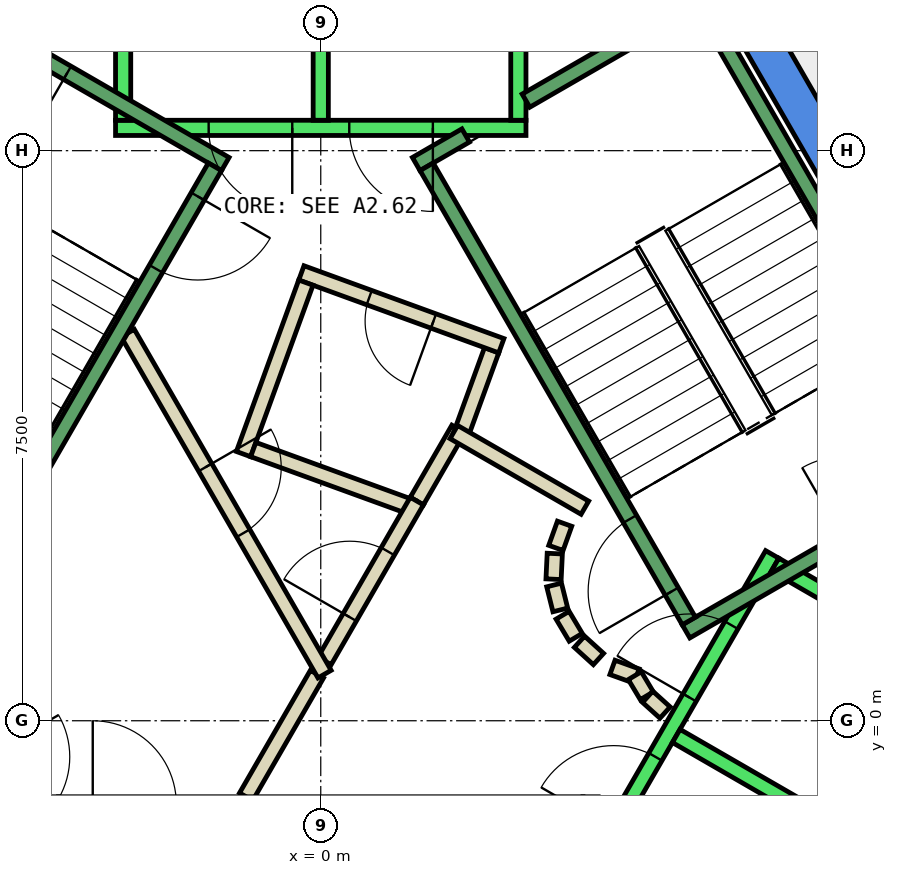
"""IFC4 building model, lengths in metres.
Left out: names, types, materials, properties, quantities, classifications, styles, units other than length and angle.
Written with IfcOpenShell. Run it as: python <this file> out.ifc"""

import sys

from ifc_helpers import new_model, si_unit, direction, frame, frame_2d, origin, place, context, subcontext, project, spatial, polyline, rectangle, outline, extrude, element, fill, save


model = new_model("IFC4")
c1 = context("Model", 3, precision=1e-05, world=origin(), true_north=direction((0.0, 1.0)))
c2 = subcontext(c1, "Body", "Model", "MODEL_VIEW")
j1 = project(units=[si_unit("LENGTHUNIT", "METRE"), si_unit("PLANEANGLEUNIT", "RADIAN")], contexts=[c1])
p1 = place(None, origin())
s1 = spatial("IfcSite", under=j1, at=p1, CompositionType="ELEMENT")
p2 = place(p1, origin())
s2 = spatial("IfcBuilding", under=s1, at=p2, CompositionType="ELEMENT")
p3 = place(p2, frame((0.0, 0.0, 293.6)))
s3 = spatial("IfcBuildingStorey", under=s2, at=p3, CompositionType="ELEMENT", Elevation=293.6)
p4 = place(p3, frame((0.0, 0.0, -0.34)))
e1 = element("IfcWall", 1, at=p4, inside=s3, PredefinedType="SHEAR", context=c2, shape_type="SweptSolid", body=[
    extrude(outline(polyline([(5.486, 9.998), (5.053, 9.748), (9.238, 2.5), (9.815, 2.5), (5.486, 9.998)])), origin(), (0.0, 0.0, 1.0), 3.6),
])
p5 = place(p3, frame((0.0, 0.0, -0.34)))
e2 = element("IfcWall", 2, at=p5, inside=s3, PredefinedType="SHEAR", context=c2, shape_type="SweptSolid", body=[
    extrude(outline(polyline([(4.907, -6.0), (9.815, 2.5), (9.238, 2.5), (4.619, -5.5), (4.907, -6.0)])), origin(), (0.0, 0.0, 1.0), 3.6),
])
p6 = place(p3, frame((1.264, 2.89, 0.0), z_axis=(0.0, 0.0, 1.0), x_axis=(0.500043792738, 0.866000118559, 0.0)))
e3 = element("IfcWall", 3, at=p6, inside=s3, PredefinedType="PARTITIONING", context=c2, shape_type="SweptSolid", body=[
    extrude(rectangle(XDim=1.096, YDim=0.2, at=frame_2d((0.548, 0.0))), origin(), (0.0, 0.0, 1.0), 3.26),
])
p7 = place(p3, frame((1.838, 3.748, 0.0), z_axis=(0.0, 0.0, 1.0), x_axis=(0.342266462435, 0.939602931398, 0.0)))
e4 = element("IfcWall", 4, at=p7, inside=s3, PredefinedType="PARTITIONING", context=c2, shape_type="SweptSolid", body=[
    extrude(rectangle(XDim=1.198, YDim=0.2, at=frame_2d((0.599, 0.0))), origin(), (0.0, 0.0, 1.0), 3.26),
])
p8 = place(p3, frame((2.376, 4.934, 0.0), z_axis=(0.0, 0.0, 1.0), x_axis=(-0.939640574808, 0.342163104635, 0.0)))
e5 = element("IfcWall", 5, at=p8, inside=s3, PredefinedType="PARTITIONING", context=c2, shape_type="SweptSolid", body=[
    extrude(rectangle(XDim=2.8, YDim=0.2, at=frame_2d((1.4, 0.0))), origin(), (0.0, 0.0, 1.0), 3.26),
])
p9 = place(p8, frame((0.95, 0.0, 0.0)))
e6 = element("IfcOpeningElement", 6, at=p9, cuts=e5, PredefinedType="OPENING", context=c2, shape_type="SweptSolid", body=[
    extrude(rectangle(XDim=0.9, YDim=2.1, at=frame_2d((0.45, 1.05))), frame((0.0, 0.11, 0.0), z_axis=(0.0, -1.0, 0.0), x_axis=(1.0, 0.0, 0.0)), (0.0, 0.0, 1.0), 0.22),
])
p10 = place(p3, frame((-0.196, 5.764, 0.0), z_axis=(0.0, 0.0, 1.0), x_axis=(-0.34165322761, -0.939826086073, 0.0)))
e7 = element("IfcWall", 7, at=p10, inside=s3, PredefinedType="PARTITIONING", context=c2, shape_type="SweptSolid", body=[
    extrude(rectangle(XDim=2.4, YDim=0.2, at=frame_2d((1.2, 0.0))), origin(), (0.0, 0.0, 1.0), 3.26),
])
p11 = place(p3, frame((-0.888, 3.568, 0.0), z_axis=(0.0, 0.0, 1.0), x_axis=(0.939685034098, -0.34204098686, 0.0)))
e8 = element("IfcWall", 8, at=p11, inside=s3, PredefinedType="PARTITIONING", context=c2, shape_type="SweptSolid", body=[
    extrude(rectangle(XDim=2.237, YDim=0.2, at=frame_2d((1.119, 0.0))), origin(), (0.0, 0.0, 1.0), 3.26),
])
p12 = place(p3, frame((-0.982, -1.0, 0.0), z_axis=(0.0, 0.0, 1.0), x_axis=(0.50024047865, 0.865886518847, 0.0)))
e9 = element("IfcWall", 9, at=p12, inside=s3, PredefinedType="PARTITIONING", context=c2, shape_type="SweptSolid", body=[
    extrude(rectangle(XDim=1.863, YDim=0.2, at=frame_2d((0.931, 0.0))), origin(), (0.0, 0.0, 1.0), 3.26),
])
p13 = place(p3, frame((0.05, 0.787, 0.0), z_axis=(0.0, 0.0, 1.0), x_axis=(0.499945861543, 0.866056658381, 0.0)))
e10 = element("IfcWall", 10, at=p13, inside=s3, PredefinedType="PARTITIONING", context=c2, shape_type="SweptSolid", body=[
    extrude(rectangle(XDim=2.428, YDim=0.2, at=frame_2d((1.214, 0.0))), origin(), (0.0, 0.0, 1.0), 3.26),
])
p14 = place(p13, frame((0.664, 0.0, 0.0)))
e11 = element("IfcOpeningElement", 11, at=p14, cuts=e10, PredefinedType="OPENING", context=c2, shape_type="SweptSolid", body=[
    extrude(rectangle(XDim=1.0, YDim=2.1, at=frame_2d((0.5, 1.05))), frame((0.0, 0.11, 0.0), z_axis=(0.0, -1.0, 0.0), x_axis=(1.0, 0.0, 0.0)), (0.0, 0.0, 1.0), 0.22),
])
p15 = place(p3, frame((1.751, 3.798, 0.0), z_axis=(0.0, 0.0, 1.0), x_axis=(0.866091650241, -0.499885240213, 0.0)))
e12 = element("IfcWall", 12, at=p15, inside=s3, PredefinedType="PARTITIONING", context=c2, shape_type="SweptSolid", body=[
    extrude(rectangle(XDim=1.991, YDim=0.2, at=frame_2d((0.995, 0.0))), origin(), (0.0, 0.0, 1.0), 3.26),
])
p16 = place(p3, frame((3.208, 2.592, 0.0), z_axis=(0.0, 0.0, 1.0), x_axis=(-0.337388820924, -0.941365382578, 0.0)))
e13 = element("IfcWall", 13, at=p16, inside=s3, PredefinedType="PARTITIONING", context=c2, shape_type="SweptSolid", body=[
    extrude(rectangle(XDim=0.338, YDim=0.2, at=frame_2d((0.169, 0.0))), origin(), (0.0, 0.0, 1.0), 3.26),
])
p17 = place(p3, frame((3.079, 2.199, 0.0), z_axis=(0.0, 0.0, 1.0), x_axis=(-0.047771483479, -0.998858290933, 0.0)))
e14 = element("IfcWall", 14, at=p17, inside=s3, PredefinedType="PARTITIONING", context=c2, shape_type="SweptSolid", body=[
    extrude(rectangle(XDim=0.337, YDim=0.2, at=frame_2d((0.169, 0.0))), origin(), (0.0, 0.0, 1.0), 3.26),
])
p18 = place(p3, frame((3.07, 1.786, 0.0), z_axis=(0.0, 0.0, 1.0), x_axis=(0.242705583207, -0.970099994784, 0.0)))
e15 = element("IfcWall", 15, at=p18, inside=s3, PredefinedType="PARTITIONING", context=c2, shape_type="SweptSolid", body=[
    extrude(rectangle(XDim=0.338, YDim=0.2, at=frame_2d((0.169, 0.0))), origin(), (0.0, 0.0, 1.0), 3.26),
])
for number, where, z_axis, x_axis in (
    (16, (3.182, 1.388, 0.0), (0.0, 0.0, 1.0), (0.512, -0.859, 0.0)),
    (17, (3.404, 1.039, 0.0), (0.0, 0.0, 1.0), (0.74, -0.672, 0.0)),
):
    element("IfcWall", number, at=place(p3, frame(where, z_axis=z_axis, x_axis=x_axis)), inside=s3, PredefinedType="PARTITIONING", context=c2, shape_type="SweptSolid", body=[
        extrude(rectangle(XDim=0.338, YDim=0.2, at=frame_2d((0.169, 0.0))), origin(), (0.0, 0.0, 1.0), 3.26),
    ])
p19 = place(p3, frame((3.838, 0.702, 0.0), z_axis=(0.0, 0.0, 1.0), x_axis=(0.941035081519, -0.338308993895, 0.0)))
e18 = element("IfcWall", 18, at=p19, inside=s3, PredefinedType="PARTITIONING", context=c2, shape_type="SweptSolid", body=[
    extrude(rectangle(XDim=0.337, YDim=0.2, at=frame_2d((0.168, 0.0))), origin(), (0.0, 0.0, 1.0), 3.26),
])
p20 = place(p3, frame((4.132, 0.593, 0.0), z_axis=(0.0, 0.0, 1.0), x_axis=(0.513561617048, -0.858052717201, 0.0)))
e19 = element("IfcWall", 19, at=p20, inside=s3, PredefinedType="PARTITIONING", context=c2, shape_type="SweptSolid", body=[
    extrude(rectangle(XDim=0.308, YDim=0.2, at=frame_2d((0.154, 0.0))), origin(), (0.0, 0.0, 1.0), 3.26),
])
p21 = place(p3, frame((4.301, 0.315, 0.0), z_axis=(0.0, 0.0, 1.0), x_axis=(0.741798017506, -0.670623367639, 0.0)))
e20 = element("IfcWall", 20, at=p21, inside=s3, PredefinedType="PARTITIONING", context=c2, shape_type="SweptSolid", body=[
    extrude(rectangle(XDim=0.309, YDim=0.2, at=frame_2d((0.154, 0.0))), origin(), (0.0, 0.0, 1.0), 3.26),
])
p22 = place(p3, frame((-2.54, 5.1, 0.0), z_axis=(0.0, 0.0, 1.0), x_axis=(0.499925051871, -0.866068670783, 0.0)))
e21 = element("IfcWall", 21, at=p22, inside=s3, PredefinedType="PARTITIONING", context=c2, shape_type="SweptSolid", body=[
    extrude(rectangle(XDim=5.181, YDim=0.2, at=frame_2d((2.59, 0.0))), origin(), (0.0, 0.0, 1.0), 3.26),
])
p23 = place(p22, frame((2.04, 0.0, 0.0)))
e22 = element("IfcOpeningElement", 22, at=p23, cuts=e21, PredefinedType="OPENING", context=c2, shape_type="SweptSolid", body=[
    extrude(rectangle(XDim=1.0, YDim=2.1, at=frame_2d((0.5, 1.05))), frame((0.0, 0.11, 0.0), z_axis=(0.0, -1.0, 0.0), x_axis=(1.0, 0.0, 0.0)), (0.0, 0.0, 1.0), 0.22),
])
p24 = place(p3, frame((2.7, 7.8, 0.0), z_axis=(0.0, 0.0, 1.0), x_axis=(-1.0, 0.0, 0.0)))
e23 = element("IfcWall", 23, at=p24, inside=s3, PredefinedType="STANDARD", context=c2, shape_type="SweptSolid", body=[
    extrude(rectangle(XDim=5.4, YDim=0.2, at=frame_2d((2.7, 0.0))), origin(), (0.0, 0.0, 1.0), 3.26),
])
p25 = place(p24, frame((1.225, 0.0, 0.0)))
e24 = element("IfcOpeningElement", 24, at=p25, cuts=e23, PredefinedType="OPENING", context=c2, shape_type="SweptSolid", body=[
    extrude(rectangle(XDim=1.1, YDim=2.1, at=frame_2d((0.55, 1.05))), frame((0.0, 0.11, 0.0), z_axis=(0.0, -1.0, 0.0), x_axis=(1.0, 0.0, 0.0)), (0.0, 0.0, 1.0), 0.22),
])
p26 = place(p24, frame((3.075, 0.0, 0.0)))
e25 = element("IfcOpeningElement", 25, at=p26, cuts=e23, PredefinedType="OPENING", context=c2, shape_type="SweptSolid", body=[
    extrude(rectangle(XDim=1.1, YDim=2.1, at=frame_2d((0.55, 1.05))), frame((0.0, 0.11, 0.0), z_axis=(0.0, -1.0, 0.0), x_axis=(1.0, 0.0, 0.0)), (0.0, 0.0, 1.0), 0.22),
])
for number, where, z_axis, x_axis in (
    (26, (2.6, 7.9, 0.0), (0.0, 0.0, 1.0), (0.0, 1.0, 0.0)),
    (27, (0.0, 7.9, 0.0), (0.0, 0.0, 1.0), (0.0, 1.0, 0.0)),
    (28, (-2.6, 7.9, 0.0), (0.0, 0.0, 1.0), (0.0, 1.0, 0.0)),
):
    element("IfcWall", number, at=place(p3, frame(where, z_axis=z_axis, x_axis=x_axis)), inside=s3, PredefinedType="STANDARD", context=c2, shape_type="SweptSolid", body=[
        extrude(rectangle(XDim=2.4, YDim=0.2, at=frame_2d((1.2, 0.0))), origin(), (0.0, 0.0, 1.0), 3.26),
    ])
p27 = place(p3, frame((-5.94, 2.188, 0.0), z_axis=(0.0, 0.0, 1.0), x_axis=(0.500034260056, -0.866005622828, 0.0)))
e29 = element("IfcWall", 29, at=p27, inside=s3, PredefinedType="STANDARD", context=c2, shape_type="SweptSolid", body=[
    extrude(rectangle(XDim=5.399, YDim=0.2, at=frame_2d((2.7, 0.0))), origin(), (0.0, 0.0, 1.0), 3.26),
])
p28 = place(p27, frame((3.075, 0.0, 0.0)))
e30 = element("IfcOpeningElement", 30, at=p28, cuts=e29, PredefinedType="OPENING", context=c2, shape_type="SweptSolid", body=[
    extrude(rectangle(XDim=1.1, YDim=2.1, at=frame_2d((0.55, 1.05))), frame((0.0, 0.11, 0.0), z_axis=(0.0, -1.0, 0.0), x_axis=(1.0, 0.0, 0.0)), (0.0, 0.0, 1.0), 0.22),
])
p29 = place(p27, frame((1.225, 0.0, 0.0)))
e31 = element("IfcOpeningElement", 31, at=p29, cuts=e29, PredefinedType="OPENING", context=c2, shape_type="SweptSolid", body=[
    extrude(rectangle(XDim=1.1, YDim=2.1, at=frame_2d((0.55, 1.05))), frame((0.0, 0.11, 0.0), z_axis=(0.0, -1.0, 0.0), x_axis=(1.0, 0.0, 0.0)), (0.0, 0.0, 1.0), 0.22),
])
p30 = place(p3, frame((3.24, -2.488, 0.0), z_axis=(0.0, 0.0, 1.0), x_axis=(0.500034260056, 0.866005622828, 0.0)))
e32 = element("IfcWall", 32, at=p30, inside=s3, PredefinedType="STANDARD", context=c2, shape_type="SweptSolid", body=[
    extrude(rectangle(XDim=5.399, YDim=0.2, at=frame_2d((2.7, 0.0))), origin(), (0.0, 0.0, 1.0), 3.26),
])
p31 = place(p30, frame((3.225, 0.0, 0.0)))
e33 = element("IfcOpeningElement", 33, at=p31, cuts=e32, PredefinedType="OPENING", context=c2, shape_type="SweptSolid", body=[
    extrude(rectangle(XDim=1.1, YDim=2.1, at=frame_2d((0.55, 1.05))), frame((0.0, 0.11, 0.0), z_axis=(0.0, -1.0, 0.0), x_axis=(1.0, 0.0, 0.0)), (0.0, 0.0, 1.0), 0.22),
])
p32 = place(p30, frame((1.225, 0.0, 0.0)))
e34 = element("IfcOpeningElement", 34, at=p32, cuts=e32, PredefinedType="OPENING", context=c2, shape_type="SweptSolid", body=[
    extrude(rectangle(XDim=1.1, YDim=2.1, at=frame_2d((0.55, 1.05))), frame((0.0, 0.11, 0.0), z_axis=(0.0, -1.0, 0.0), x_axis=(1.0, 0.0, 0.0)), (0.0, 0.0, 1.0), 0.22),
])
p33 = place(p3, frame((5.492, -3.788, 0.0), z_axis=(0.0, 0.0, 1.0), x_axis=(0.500034260056, 0.866005622828, 0.0)))
e35 = element("IfcWall", 35, at=p33, inside=s3, PredefinedType="STANDARD", context=c2, shape_type="SweptSolid", body=[
    extrude(rectangle(XDim=5.399, YDim=0.2, at=frame_2d((2.7, 0.0))), origin(), (0.0, 0.0, 1.0), 3.26),
])
for number, where, z_axis, x_axis in (
    (36, (4.677, -0.2, 0.0), (0.0, 0.0, 1.0), (0.866, -0.5, 0.0)),
    (37, (5.977, 2.052, 0.0), (0.0, 0.0, 1.0), (0.866, -0.5, 0.0)),
):
    element("IfcWall", number, at=place(p3, frame(where, z_axis=z_axis, x_axis=x_axis)), inside=s3, PredefinedType="STANDARD", context=c2, shape_type="SweptSolid", body=[
        extrude(rectangle(XDim=2.399, YDim=0.2, at=frame_2d((1.2, 0.0))), origin(), (0.0, 0.0, 1.0), 3.26),
    ])
p34 = place(p3, frame((4.806, 1.176, 0.0), z_axis=(0.0, 0.0, 1.0), x_axis=(0.866059941101, 0.499940174841, 0.0)))
e38 = element("IfcWall", 38, at=p34, inside=s3, PredefinedType="STANDARD", context=c2, shape_type="SweptSolid", body=[
    extrude(rectangle(XDim=4.4, YDim=0.2, at=frame_2d((2.2, 0.0))), origin(), (0.0, 0.0, 1.0), 3.26),
])
p35 = place(p34, frame((2.4, 0.0, 0.0)))
e39 = element("IfcOpeningElement", 39, at=p35, cuts=e38, PredefinedType="OPENING", context=c2, shape_type="SweptSolid", body=[
    extrude(rectangle(XDim=1.1, YDim=2.2, at=frame_2d((0.55, 1.1))), frame((0.0, 0.11, 0.0), z_axis=(0.0, -1.0, 0.0), x_axis=(1.0, 0.0, 0.0)), (0.0, 0.0, 1.0), 0.22),
])
p36 = place(p3, frame((2.7, 8.158, 0.0), z_axis=(0.0, 0.0, 1.0), x_axis=(0.86611865017, 0.499838457731, 0.0)))
e40 = element("IfcWall", 40, at=p36, inside=s3, PredefinedType="STANDARD", context=c2, shape_type="SweptSolid", body=[
    extrude(rectangle(XDim=2.733, YDim=0.2, at=frame_2d((1.366, 0.0))), origin(), (0.0, 0.0, 1.0), 3.26),
])
p37 = place(p3, frame((1.256, 7.324, 0.0), z_axis=(0.0, 0.0, 1.0), x_axis=(0.865915093549, 0.500191014278, 0.0)))
e41 = element("IfcWall", 41, at=p37, inside=s3, PredefinedType="STANDARD", context=c2, shape_type="SweptSolid", body=[
    extrude(rectangle(XDim=0.752, YDim=0.2, at=frame_2d((0.376, 0.0))), origin(), (0.0, 0.0, 1.0), 3.26),
])
p38 = place(p3, frame((4.843, 1.312, 0.0), z_axis=(0.0, 0.0, 1.0), x_axis=(-0.499963383562, 0.866046543262, 0.0)))
e42 = element("IfcWall", 42, at=p38, inside=s3, PredefinedType="STANDARD", context=c2, shape_type="SweptSolid", body=[
    extrude(rectangle(XDim=6.9, YDim=0.2, at=frame_2d((3.45, 0.0))), origin(), (0.0, 0.0, 1.0), 3.26),
])
p39 = place(p38, frame((0.45, 0.0, 0.0)))
e43 = element("IfcOpeningElement", 43, at=p39, cuts=e42, PredefinedType="OPENING", context=c2, shape_type="SweptSolid", body=[
    extrude(rectangle(XDim=1.1, YDim=2.2, at=frame_2d((0.55, 1.1))), frame((0.0, 0.11, 0.0), z_axis=(0.0, -1.0, 0.0), x_axis=(1.0, 0.0, 0.0)), (0.0, 0.0, 1.0), 0.22),
])
p40 = place(p3, frame((8.48, 3.412, 0.0), z_axis=(0.0, 0.0, 1.0), x_axis=(-0.499978703459, 0.866037698999, 0.0)))
e44 = element("IfcWall", 44, at=p40, inside=s3, PredefinedType="STANDARD", context=c2, shape_type="SweptSolid", body=[
    extrude(rectangle(XDim=6.9, YDim=0.2, at=frame_2d((3.45, 0.0))), origin(), (0.0, 0.0, 1.0), 3.26),
])
p41 = place(p3, frame((-1.256, 7.324, 0.0), z_axis=(0.0, 0.0, 1.0), x_axis=(-0.866046073146, 0.499964197906, 0.0)))
e45 = element("IfcWall", 45, at=p41, inside=s3, PredefinedType="STANDARD", context=c2, shape_type="SweptSolid", body=[
    extrude(rectangle(XDim=4.4, YDim=0.2, at=frame_2d((2.2, 0.0))), origin(), (0.0, 0.0, 1.0), 3.26),
])
p42 = place(p41, frame((2.4, 0.0, 0.0)))
e46 = element("IfcOpeningElement", 46, at=p42, cuts=e45, PredefinedType="OPENING", context=c2, shape_type="SweptSolid", body=[
    extrude(rectangle(XDim=1.1, YDim=2.2, at=frame_2d((0.55, 1.1))), frame((0.0, 0.11, 0.0), z_axis=(0.0, -1.0, 0.0), x_axis=(1.0, 0.0, 0.0)), (0.0, 0.0, 1.0), 0.22),
])
p43 = place(p3, frame((-1.393, 7.288, 0.0), z_axis=(0.0, 0.0, 1.0), x_axis=(-0.499963383562, -0.866046543262, 0.0)))
e47 = element("IfcWall", 47, at=p43, inside=s3, PredefinedType="STANDARD", context=c2, shape_type="SweptSolid", body=[
    extrude(rectangle(XDim=6.9, YDim=0.2, at=frame_2d((3.45, 0.0))), origin(), (0.0, 0.0, 1.0), 3.26),
])
p44 = place(p43, frame((0.45, 0.0, 0.0)))
e48 = element("IfcOpeningElement", 48, at=p44, cuts=e47, PredefinedType="OPENING", context=c2, shape_type="SweptSolid", body=[
    extrude(rectangle(XDim=1.1, YDim=2.2, at=frame_2d((0.55, 1.1))), frame((0.0, 0.11, 0.0), z_axis=(0.0, -1.0, 0.0), x_axis=(1.0, 0.0, 0.0)), (0.0, 0.0, 1.0), 0.22),
])
p45 = place(p14, origin())
e49 = element("IfcDoor", 49, at=p45, inside=s3, OperationType="SINGLE_SWING_RIGHT", PredefinedType="DOOR", context=c2, shape_type="SweptSolid", body=[
    extrude(rectangle(XDim=1.0, YDim=2.1, at=frame_2d((0.5, 1.05))), frame((0.0, 0.025, 0.0), z_axis=(0.0, -1.0, 0.0), x_axis=(1.0, 0.0, 0.0)), (0.0, 0.0, 1.0), 0.05),
])
fill(e11, e49)
p46 = place(p23, origin())
e50 = element("IfcDoor", 50, at=p46, inside=s3, OperationType="SINGLE_SWING_RIGHT", PredefinedType="DOOR", context=c2, shape_type="SweptSolid", body=[
    extrude(rectangle(XDim=1.0, YDim=2.1, at=frame_2d((0.5, 1.05))), frame((0.0, 0.025, 0.0), z_axis=(0.0, -1.0, 0.0), x_axis=(1.0, 0.0, 0.0)), (0.0, 0.0, 1.0), 0.05),
])
fill(e22, e50)
p47 = place(p9, origin())
e51 = element("IfcDoor", 51, at=p47, inside=s3, OperationType="SINGLE_SWING_LEFT", PredefinedType="DOOR", context=c2, shape_type="SweptSolid", body=[
    extrude(rectangle(XDim=0.9, YDim=2.1, at=frame_2d((0.45, 1.05))), frame((0.0, 0.025, 0.0), z_axis=(0.0, -1.0, 0.0), x_axis=(1.0, 0.0, 0.0)), (0.0, 0.0, 1.0), 0.05),
])
fill(e6, e51)
p48 = place(p25, origin())
e52 = element("IfcDoor", 52, at=p48, inside=s3, OperationType="SLIDING_TO_LEFT", PredefinedType="DOOR", context=c2, shape_type="SweptSolid", body=[
    extrude(rectangle(XDim=1.1, YDim=2.1, at=frame_2d((0.55, 1.05))), frame((0.0, 0.025, 0.0), z_axis=(0.0, -1.0, 0.0), x_axis=(1.0, 0.0, 0.0)), (0.0, 0.0, 1.0), 0.05),
])
fill(e24, e52)
p49 = place(p26, origin())
e53 = element("IfcDoor", 53, at=p49, inside=s3, OperationType="SLIDING_TO_LEFT", PredefinedType="DOOR", context=c2, shape_type="SweptSolid", body=[
    extrude(rectangle(XDim=1.1, YDim=2.1, at=frame_2d((0.55, 1.05))), frame((0.0, 0.025, 0.0), z_axis=(0.0, -1.0, 0.0), x_axis=(1.0, 0.0, 0.0)), (0.0, 0.0, 1.0), 0.05),
])
fill(e25, e53)
p50 = place(p31, origin())
e54 = element("IfcDoor", 54, at=p50, inside=s3, OperationType="SLIDING_TO_LEFT", PredefinedType="DOOR", context=c2, shape_type="SweptSolid", body=[
    extrude(rectangle(XDim=1.1, YDim=2.1, at=frame_2d((0.55, 1.05))), frame((0.0, 0.025, 0.0), z_axis=(0.0, -1.0, 0.0), x_axis=(1.0, 0.0, 0.0)), (0.0, 0.0, 1.0), 0.05),
])
fill(e33, e54)
p51 = place(p32, origin())
e55 = element("IfcDoor", 55, at=p51, inside=s3, OperationType="SLIDING_TO_LEFT", PredefinedType="DOOR", context=c2, shape_type="SweptSolid", body=[
    extrude(rectangle(XDim=1.1, YDim=2.1, at=frame_2d((0.55, 1.05))), frame((0.0, 0.025, 0.0), z_axis=(0.0, -1.0, 0.0), x_axis=(1.0, 0.0, 0.0)), (0.0, 0.0, 1.0), 0.05),
])
fill(e34, e55)
p52 = place(p39, origin())
e56 = element("IfcDoor", 56, at=p52, inside=s3, OperationType="SINGLE_SWING_LEFT", PredefinedType="DOOR", context=c2, shape_type="SweptSolid", body=[
    extrude(rectangle(XDim=1.1, YDim=2.2, at=frame_2d((0.55, 1.1))), frame((0.0, 0.025, 0.0), z_axis=(0.0, -1.0, 0.0), x_axis=(1.0, 0.0, 0.0)), (0.0, 0.0, 1.0), 0.05),
])
fill(e43, e56)
p53 = place(p44, origin())
e57 = element("IfcDoor", 57, at=p53, inside=s3, OperationType="SINGLE_SWING_LEFT", PredefinedType="DOOR", context=c2, shape_type="SweptSolid", body=[
    extrude(rectangle(XDim=1.1, YDim=2.2, at=frame_2d((0.55, 1.1))), frame((0.0, 0.025, 0.0), z_axis=(0.0, -1.0, 0.0), x_axis=(1.0, 0.0, 0.0)), (0.0, 0.0, 1.0), 0.05),
])
fill(e48, e57)
p54 = place(p42, origin())
e58 = element("IfcDoor", 58, at=p54, inside=s3, OperationType="SINGLE_SWING_LEFT", PredefinedType="DOOR", context=c2, shape_type="SweptSolid", body=[
    extrude(rectangle(XDim=1.1, YDim=2.2, at=frame_2d((0.55, 1.1))), frame((0.0, 0.025, 0.0), z_axis=(0.0, -1.0, 0.0), x_axis=(1.0, 0.0, 0.0)), (0.0, 0.0, 1.0), 0.05),
])
fill(e46, e58)
save(model, sys.argv[1])
